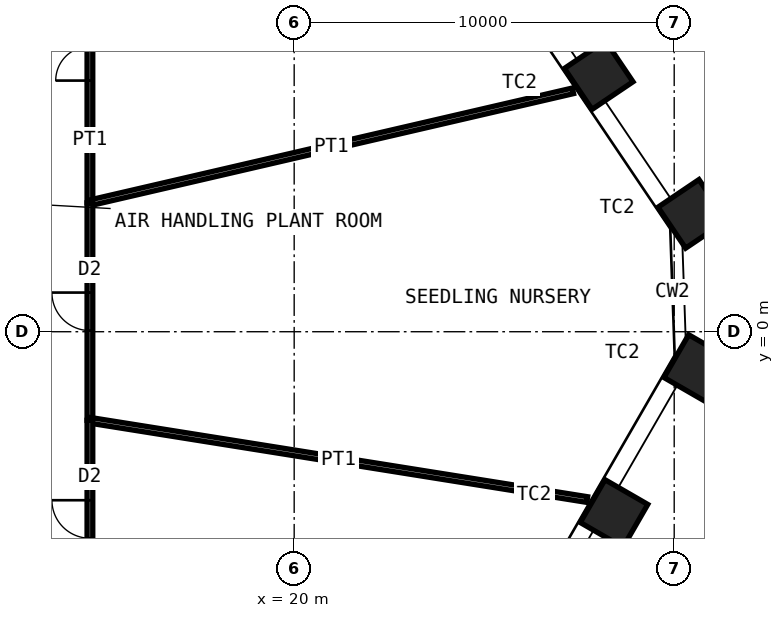
"""IFC4 building model, lengths in metres.
Left out: names, types, materials, properties, quantities, classifications, styles, units other than length and angle.
Written with IfcOpenShell. Run it as: python <this file> out.ifc"""

import sys

from ifc_helpers import new_model, si_unit, direction, frame, frame_2d, origin, origin_2d, place, context, subcontext, project, spatial, rectangle, hollow_rectangle, extrude, element, fill, save


model = new_model("IFC4")
c1 = context("Model", 3, precision=1e-05, world=origin(), true_north=direction((0.0, 1.0)))
c2 = subcontext(c1, "Body", "Model", "MODEL_VIEW")
j1 = project(units=[si_unit("LENGTHUNIT", "METRE"), si_unit("PLANEANGLEUNIT", "RADIAN")], contexts=[c1])
p1 = place(None, origin())
s1 = spatial("IfcSite", under=j1, at=p1, CompositionType="ELEMENT")
p2 = place(p1, origin())
s2 = spatial("IfcBuilding", under=s1, at=p2, CompositionType="ELEMENT")
p3 = place(p2, frame((0.0, 0.0, 72.0)))
s3 = spatial("IfcBuildingStorey", under=s2, at=p3, CompositionType="ELEMENT", Elevation=72.0)
for number, where, z_axis, x_axis in (
    (1, (28.013, 6.752, 0.0), (0.0, 0.0, 1.0), (-0.559, 0.829, 0.0)),
    (2, (30.476, 3.101, 0.0), (0.0, 0.0, 1.0), (-0.559, 0.829, 0.0)),
    (3, (30.618, -0.967, 0.0), (0.0, 0.0, 1.0), (0.5, 0.866, 0.0)),
    (4, (28.416, -4.782, 0.0), (0.0, 0.0, 1.0), (0.5, 0.866, 0.0)),
):
    element("IfcColumn", number, at=place(p3, frame(where, z_axis=z_axis, x_axis=x_axis)), inside=s3, PredefinedType="COLUMN", context=c2, shape_type="SweptSolid", body=[
        extrude(hollow_rectangle(XDim=1.3, YDim=1.3, WallThickness=0.1, at=origin_2d()), origin(), (0.0, 0.0, 1.0), 5.0),
    ])
p4 = place(p3, frame((14.625, 11.625, 0.0), z_axis=(0.0, 0.0, 1.0), x_axis=(0.0, -1.0, 0.0)))
e5 = element("IfcWall", 5, at=p4, inside=s3, PredefinedType="PARTITIONING", context=c2, shape_type="SweptSolid", body=[
    extrude(rectangle(XDim=8.234, YDim=0.15, at=frame_2d((4.117, 0.0))), origin(), (0.0, 0.0, 1.0), 4.8),
])
p5 = place(p4, frame((3.217, 0.0, 0.0)))
e6 = element("IfcOpeningElement", 6, at=p5, cuts=e5, PredefinedType="OPENING", context=c2, shape_type="SweptSolid", body=[
    extrude(rectangle(XDim=1.8, YDim=2.4, at=frame_2d((0.9, 1.2))), frame((0.0, 0.085, 0.0), z_axis=(0.0, -1.0, 0.0), x_axis=(1.0, 0.0, 0.0)), (0.0, 0.0, 1.0), 0.17),
])
p6 = place(p3, frame((27.336, 6.338, 0.0), z_axis=(0.0, 0.0, 1.0), x_axis=(-0.974155090553, -0.225880188486, 0.0)))
e7 = element("IfcWall", 7, at=p6, inside=s3, PredefinedType="PARTITIONING", context=c2, shape_type="SweptSolid", body=[
    extrude(rectangle(XDim=13.048, YDim=0.15, at=frame_2d((6.524, 0.0))), origin(), (0.0, 0.0, 1.0), 3.7),
])
p7 = place(p3, frame((14.625, 3.391, 0.0), z_axis=(0.0, 0.0, 1.0), x_axis=(0.0, -1.0, 0.0)))
e8 = element("IfcWall", 8, at=p7, inside=s3, PredefinedType="PARTITIONING", context=c2, shape_type="SweptSolid", body=[
    extrude(rectangle(XDim=5.722, YDim=0.15, at=frame_2d((2.861, 0.0))), origin(), (0.0, 0.0, 1.0), 4.8),
])
p8 = place(p7, frame((2.361, 0.0, 0.0)))
e9 = element("IfcOpeningElement", 9, at=p8, cuts=e8, PredefinedType="OPENING", context=c2, shape_type="SweptSolid", body=[
    extrude(rectangle(XDim=1.0, YDim=2.4, at=frame_2d((0.5, 1.2))), frame((0.0, 0.085, 0.0), z_axis=(0.0, -1.0, 0.0), x_axis=(1.0, 0.0, 0.0)), (0.0, 0.0, 1.0), 0.17),
])
p9 = place(p3, frame((27.711, -4.416, 0.0), z_axis=(0.0, 0.0, 1.0), x_axis=(-0.987538625309, 0.15737682016, 0.0)))
e10 = element("IfcWall", 10, at=p9, inside=s3, PredefinedType="PARTITIONING", context=c2, shape_type="SweptSolid", body=[
    extrude(rectangle(XDim=13.251, YDim=0.15, at=frame_2d((6.625, 0.0))), origin(), (0.0, 0.0, 1.0), 3.7),
])
p10 = place(p3, frame((14.625, -2.331, 0.0), z_axis=(0.0, 0.0, 1.0), x_axis=(0.0, -1.0, 0.0)))
e11 = element("IfcWall", 11, at=p10, inside=s3, PredefinedType="PARTITIONING", context=c2, shape_type="SweptSolid", body=[
    extrude(rectangle(XDim=5.206, YDim=0.15, at=frame_2d((2.603, 0.0))), origin(), (0.0, 0.0, 1.0), 4.8),
])
p11 = place(p10, frame((2.103, 0.0, 0.0)))
e12 = element("IfcOpeningElement", 12, at=p11, cuts=e11, PredefinedType="OPENING", context=c2, shape_type="SweptSolid", body=[
    extrude(rectangle(XDim=1.0, YDim=2.4, at=frame_2d((0.5, 1.2))), frame((0.0, 0.085, 0.0), z_axis=(0.0, -1.0, 0.0), x_axis=(1.0, 0.0, 0.0)), (0.0, 0.0, 1.0), 0.17),
])
p12 = place(p5, origin())
e13 = element("IfcDoor", 13, at=p12, inside=s3, OperationType="DOUBLE_DOOR_DOUBLE_SWING", PredefinedType="DOOR", context=c2, shape_type="SweptSolid", body=[
    extrude(rectangle(XDim=1.8, YDim=2.4, at=frame_2d((0.9, 1.2))), frame((0.0, 0.025, 0.0), z_axis=(0.0, -1.0, 0.0), x_axis=(1.0, 0.0, 0.0)), (0.0, 0.0, 1.0), 0.05),
])
fill(e6, e13)
p13 = place(p8, origin())
e14 = element("IfcDoor", 14, at=p13, inside=s3, OperationType="SINGLE_SWING_LEFT", PredefinedType="DOOR", context=c2, shape_type="SweptSolid", body=[
    extrude(rectangle(XDim=1.0, YDim=2.4, at=frame_2d((0.5, 1.2))), frame((0.0, 0.025, 0.0), z_axis=(0.0, -1.0, 0.0), x_axis=(1.0, 0.0, 0.0)), (0.0, 0.0, 1.0), 0.05),
])
fill(e9, e14)
p14 = place(p11, origin())
e15 = element("IfcDoor", 15, at=p14, inside=s3, OperationType="SINGLE_SWING_LEFT", PredefinedType="DOOR", context=c2, shape_type="SweptSolid", body=[
    extrude(rectangle(XDim=1.0, YDim=2.4, at=frame_2d((0.5, 1.2))), frame((0.0, 0.025, 0.0), z_axis=(0.0, -1.0, 0.0), x_axis=(1.0, 0.0, 0.0)), (0.0, 0.0, 1.0), 0.05),
])
fill(e12, e15)
save(model, sys.argv[1])
